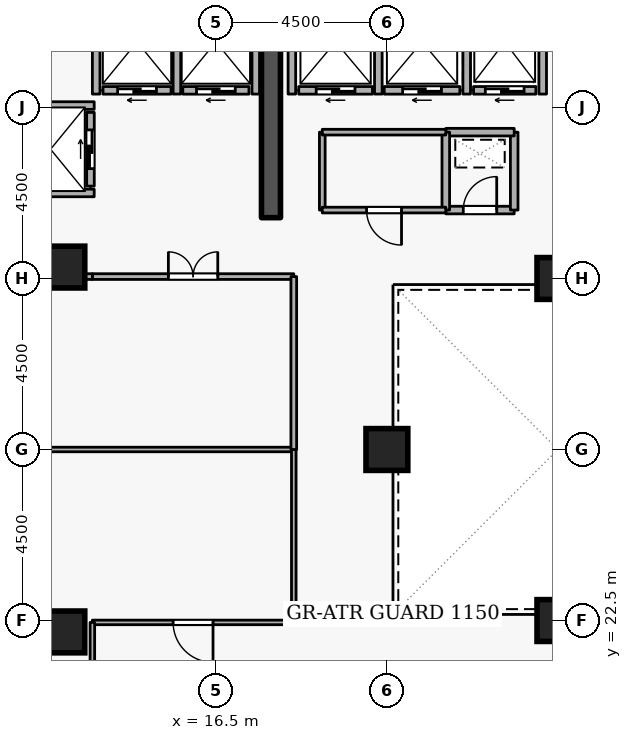
"""IFC4 building model, lengths in metres.
Left out: names, types, materials, properties, quantities, classifications, styles, units other than length and angle.
Written with IfcOpenShell. Run it as: python <this file> out.ifc"""

import sys

from ifc_helpers import new_model, si_unit, direction, frame, frame_2d, origin, origin_2d, place, context, subcontext, project, spatial, rectangle, extrude, element, fill, save


model = new_model("IFC4")
c1 = context("Model", 3, precision=1e-05, world=origin(), true_north=direction((0.0, 1.0)))
c2 = subcontext(c1, "Body", "Model", "MODEL_VIEW")
j1 = project(units=[si_unit("LENGTHUNIT", "METRE"), si_unit("PLANEANGLEUNIT", "RADIAN")], contexts=[c1])
p1 = place(None, origin())
s1 = spatial("IfcSite", under=j1, at=p1, CompositionType="ELEMENT")
p2 = place(p1, origin())
s2 = spatial("IfcBuilding", under=s1, at=p2, CompositionType="ELEMENT")
p3 = place(p2, frame((0.0, 0.0, 182.1)))
s3 = spatial("IfcBuildingStorey", under=s2, at=p3, CompositionType="ELEMENT", Elevation=182.1)
p4 = place(p3, frame((17.95, 33.1, 0.0), z_axis=(0.0, 0.0, 1.0), x_axis=(0.0, 1.0, 0.0)))
e1 = element("IfcWall", 1, at=p4, inside=s3, PredefinedType="SHEAR", context=c2, shape_type="SweptSolid", body=[
    extrude(rectangle(XDim=5.8, YDim=0.5, at=frame_2d((2.9, 0.0))), origin(), (0.0, 0.0, 1.0), 3.6),
])
for number, where, z_axis, x_axis in (
    (2, (12.5, 22.2, 0.0), (0.0, 0.0, 1.0), (1.0, 0.0, 0.0)),
    (3, (12.5, 31.8, 0.0), (0.0, 0.0, 1.0), (1.0, 0.0, 0.0)),
    (4, (25.5, 22.5, 0.0), (0.0, 0.0, 1.0), (1.0, 0.0, 0.0)),
    (5, (25.5, 31.5, 0.0), (0.0, 0.0, 1.0), (1.0, 0.0, 0.0)),
    (6, (21.0, 27.0, 0.0), (0.0, 0.0, 1.0), (1.0, 0.0, 0.0)),
):
    element("IfcColumn", number, at=place(p3, frame(where, z_axis=z_axis, x_axis=x_axis)), inside=s3, PredefinedType="COLUMN", context=c2, shape_type="SweptSolid", body=[
        extrude(rectangle(XDim=1.1, YDim=1.1, at=origin_2d()), origin(), (0.0, 0.0, 1.0), 3.6),
    ])
p5 = place(p3, frame((24.92, 36.45, 0.0), z_axis=(0.0, 0.0, 1.0), x_axis=(-1.0, 0.0, 0.0)))
e7 = element("IfcWall", 7, at=p5, inside=s3, PredefinedType="STANDARD", context=c2, shape_type="SweptSolid", body=[
    extrude(rectangle(XDim=1.64, YDim=0.2, at=frame_2d((0.82, 0.0))), origin(), (0.0, 0.0, 1.0), 3.34),
])
p6 = place(p5, frame((0.31, 0.0, 0.0)))
e8 = element("IfcOpeningElement", 8, at=p6, cuts=e7, PredefinedType="OPENING", context=c2, shape_type="SweptSolid", body=[
    extrude(rectangle(XDim=1.02, YDim=2.06, at=frame_2d((0.51, 1.03))), frame((0.0, 0.11, 0.0), z_axis=(0.0, -1.0, 0.0), x_axis=(1.0, 0.0, 0.0)), (0.0, 0.0, 1.0), 0.22),
])
p7 = place(p3, frame((22.92, 36.45, 0.0), z_axis=(0.0, 0.0, 1.0), x_axis=(-1.0, 0.0, 0.0)))
e9 = element("IfcWall", 9, at=p7, inside=s3, PredefinedType="STANDARD", context=c2, shape_type="SweptSolid", body=[
    extrude(rectangle(XDim=1.99, YDim=0.2, at=frame_2d((0.995, 0.0))), origin(), (0.0, 0.0, 1.0), 3.34),
])
p8 = place(p7, frame((0.485, 0.0, 0.0)))
e10 = element("IfcOpeningElement", 10, at=p8, cuts=e9, PredefinedType="OPENING", context=c2, shape_type="SweptSolid", body=[
    extrude(rectangle(XDim=1.02, YDim=2.06, at=frame_2d((0.51, 1.03))), frame((0.0, 0.11, 0.0), z_axis=(0.0, -1.0, 0.0), x_axis=(1.0, 0.0, 0.0)), (0.0, 0.0, 1.0), 0.22),
])
p9 = place(p3, frame((20.62, 36.45, 0.0), z_axis=(0.0, 0.0, 1.0), x_axis=(-1.0, 0.0, 0.0)))
e11 = element("IfcWall", 11, at=p9, inside=s3, PredefinedType="STANDARD", context=c2, shape_type="SweptSolid", body=[
    extrude(rectangle(XDim=1.94, YDim=0.2, at=frame_2d((0.97, 0.0))), origin(), (0.0, 0.0, 1.0), 3.34),
])
p10 = place(p9, frame((0.46, 0.0, 0.0)))
e12 = element("IfcOpeningElement", 12, at=p10, cuts=e11, PredefinedType="OPENING", context=c2, shape_type="SweptSolid", body=[
    extrude(rectangle(XDim=1.02, YDim=2.06, at=frame_2d((0.51, 1.03))), frame((0.0, 0.11, 0.0), z_axis=(0.0, -1.0, 0.0), x_axis=(1.0, 0.0, 0.0)), (0.0, 0.0, 1.0), 0.22),
])
p11 = place(p3, frame((17.37, 36.45, 0.0), z_axis=(0.0, 0.0, 1.0), x_axis=(-1.0, 0.0, 0.0)))
e13 = element("IfcWall", 13, at=p11, inside=s3, PredefinedType="STANDARD", context=c2, shape_type="SweptSolid", body=[
    extrude(rectangle(XDim=1.74, YDim=0.2, at=frame_2d((0.87, 0.0))), origin(), (0.0, 0.0, 1.0), 3.34),
])
p12 = place(p11, frame((0.36, 0.0, 0.0)))
e14 = element("IfcOpeningElement", 14, at=p12, cuts=e13, PredefinedType="OPENING", context=c2, shape_type="SweptSolid", body=[
    extrude(rectangle(XDim=1.02, YDim=2.06, at=frame_2d((0.51, 1.03))), frame((0.0, 0.11, 0.0), z_axis=(0.0, -1.0, 0.0), x_axis=(1.0, 0.0, 0.0)), (0.0, 0.0, 1.0), 0.22),
])
p13 = place(p3, frame((15.32, 36.45, 0.0), z_axis=(0.0, 0.0, 1.0), x_axis=(-1.0, 0.0, 0.0)))
e15 = element("IfcWall", 15, at=p13, inside=s3, PredefinedType="STANDARD", context=c2, shape_type="SweptSolid", body=[
    extrude(rectangle(XDim=1.79, YDim=0.2, at=frame_2d((0.895, 0.0))), origin(), (0.0, 0.0, 1.0), 3.34),
])
p14 = place(p13, frame((0.385, 0.0, 0.0)))
e16 = element("IfcOpeningElement", 16, at=p14, cuts=e15, PredefinedType="OPENING", context=c2, shape_type="SweptSolid", body=[
    extrude(rectangle(XDim=1.02, YDim=2.06, at=frame_2d((0.51, 1.03))), frame((0.0, 0.11, 0.0), z_axis=(0.0, -1.0, 0.0), x_axis=(1.0, 0.0, 0.0)), (0.0, 0.0, 1.0), 0.22),
])
p15 = place(p3, frame((13.2, 33.93, 0.0), z_axis=(0.0, 0.0, 1.0), x_axis=(0.0, 1.0, 0.0)))
e17 = element("IfcWall", 17, at=p15, inside=s3, PredefinedType="STANDARD", context=c2, shape_type="SweptSolid", body=[
    extrude(rectangle(XDim=1.94, YDim=0.2, at=frame_2d((0.97, 0.0))), origin(), (0.0, 0.0, 1.0), 3.34),
])
p16 = place(p15, frame((0.46, 0.0, 0.0)))
e18 = element("IfcOpeningElement", 18, at=p16, cuts=e17, PredefinedType="OPENING", context=c2, shape_type="SweptSolid", body=[
    extrude(rectangle(XDim=1.02, YDim=2.06, at=frame_2d((0.51, 1.03))), frame((0.0, 0.11, 0.0), z_axis=(0.0, -1.0, 0.0), x_axis=(1.0, 0.0, 0.0)), (0.0, 0.0, 1.0), 0.22),
])
for number, where, z_axis, x_axis in (
    (19, (25.1, 36.352, 0.0), (0.0, 0.0, 1.0), (0.0, 1.0, 0.0)),
    (20, (23.1, 36.352, 0.0), (0.0, 0.0, 1.0), (0.0, 1.0, 0.0)),
    (21, (20.775, 36.352, 0.0), (0.0, 0.0, 1.0), (0.0, 1.0, 0.0)),
    (22, (18.5, 36.352, 0.0), (0.0, 0.0, 1.0), (0.0, 1.0, 0.0)),
):
    element("IfcWall", number, at=place(p3, frame(where, z_axis=z_axis, x_axis=x_axis)), inside=s3, PredefinedType="STANDARD", context=c2, shape_type="SweptSolid", body=[
        extrude(rectangle(XDim=2.536, YDim=0.2, at=frame_2d((1.268, 0.0))), origin(), (0.0, 0.0, 1.0), 3.34),
    ])
p17 = place(p3, frame((17.55, 36.352, 0.0), z_axis=(0.0, 0.0, 1.0), x_axis=(0.0, 1.0, 0.0)))
e23 = element("IfcWall", 23, at=p17, inside=s3, PredefinedType="STANDARD", context=c2, shape_type="SweptSolid", body=[
    extrude(rectangle(XDim=2.636, YDim=0.2, at=frame_2d((1.318, 0.0))), origin(), (0.0, 0.0, 1.0), 2.545),
])
for number, where, z_axis, x_axis in (
    (24, (15.475, 36.352, 0.0), (0.0, 0.0, 1.0), (0.0, 1.0, 0.0)),
    (25, (13.35, 36.352, 0.0), (0.0, 0.0, 1.0), (0.0, 1.0, 0.0)),
):
    element("IfcWall", number, at=place(p3, frame(where, z_axis=z_axis, x_axis=x_axis)), inside=s3, PredefinedType="STANDARD", context=c2, shape_type="SweptSolid", body=[
        extrude(rectangle(XDim=2.636, YDim=0.2, at=frame_2d((1.318, 0.0))), origin(), (0.0, 0.0, 1.0), 3.34),
    ])
for number, where, z_axis, x_axis in (
    (26, (11.002, 36.05, 0.0), (0.0, 0.0, 1.0), (1.0, 0.0, 0.0)),
    (27, (11.002, 33.75, 0.0), (0.0, 0.0, 1.0), (1.0, 0.0, 0.0)),
):
    element("IfcWall", number, at=place(p3, frame(where, z_axis=z_axis, x_axis=x_axis)), inside=s3, PredefinedType="STANDARD", context=c2, shape_type="SweptSolid", body=[
        extrude(rectangle(XDim=2.296, YDim=0.2, at=frame_2d((1.148, 0.0))), origin(), (0.0, 0.0, 1.0), 3.34),
    ])
p18 = place(p3, frame((22.55, 33.3, 0.0), z_axis=(0.0, 0.0, 1.0), x_axis=(1.0, 0.0, 0.0)))
e28 = element("IfcWall", 28, at=p18, inside=s3, PredefinedType="STANDARD", context=c2, shape_type="SweptSolid", body=[
    extrude(rectangle(XDim=1.8, YDim=0.2, at=frame_2d((0.9, 0.0))), origin(), (0.0, 0.0, 1.0), 3.34),
])
p19 = place(p18, frame((0.46, 0.0, 0.0)))
e29 = element("IfcOpeningElement", 29, at=p19, cuts=e28, PredefinedType="OPENING", context=c2, shape_type="SweptSolid", body=[
    extrude(rectangle(XDim=0.88, YDim=2.04, at=frame_2d((0.44, 1.02))), frame((0.0, 0.11, 0.0), z_axis=(0.0, -1.0, 0.0), x_axis=(1.0, 0.0, 0.0)), (0.0, 0.0, 1.0), 0.22),
])
p20 = place(p3, frame((24.35, 33.3, 0.0), z_axis=(0.0, 0.0, 1.0), x_axis=(0.0, 1.0, 0.0)))
e30 = element("IfcWall", 30, at=p20, inside=s3, PredefinedType="STANDARD", context=c2, shape_type="SweptSolid", body=[
    extrude(rectangle(XDim=2.05, YDim=0.2, at=frame_2d((1.025, 0.0))), origin(), (0.0, 0.0, 1.0), 3.34),
])
p21 = place(p3, frame((24.35, 35.35, 0.0), z_axis=(0.0, 0.0, 1.0), x_axis=(-1.0, 0.0, 0.0)))
e31 = element("IfcWall", 31, at=p21, inside=s3, PredefinedType="STANDARD", context=c2, shape_type="SweptSolid", body=[
    extrude(rectangle(XDim=1.8, YDim=0.2, at=frame_2d((0.9, 0.0))), origin(), (0.0, 0.0, 1.0), 3.34),
])
p22 = place(p3, frame((22.55, 35.35, 0.0), z_axis=(0.0, 0.0, 1.0), x_axis=(0.0, -1.0, 0.0)))
e32 = element("IfcWall", 32, at=p22, inside=s3, PredefinedType="STANDARD", context=c2, shape_type="SweptSolid", body=[
    extrude(rectangle(XDim=2.05, YDim=0.2, at=frame_2d((1.025, 0.0))), origin(), (0.0, 0.0, 1.0), 3.34),
])
p23 = place(p3, frame((19.3, 33.3, 0.0), z_axis=(0.0, 0.0, 1.0), x_axis=(0.0, 1.0, 0.0)))
e33 = element("IfcWall", 33, at=p23, inside=s3, PredefinedType="PARTITIONING", context=c2, shape_type="SweptSolid", body=[
    extrude(rectangle(XDim=2.05, YDim=0.15, at=frame_2d((1.025, 0.0))), origin(), (0.0, 0.0, 1.0), 3.34),
])
p24 = place(p3, frame((19.3, 35.35, 0.0), z_axis=(0.0, 0.0, 1.0), x_axis=(1.0, 0.0, 0.0)))
e34 = element("IfcWall", 34, at=p24, inside=s3, PredefinedType="PARTITIONING", context=c2, shape_type="SweptSolid", body=[
    extrude(rectangle(XDim=3.25, YDim=0.15, at=frame_2d((1.625, 0.0))), origin(), (0.0, 0.0, 1.0), 3.34),
])
p25 = place(p3, frame((22.55, 33.3, 0.0), z_axis=(0.0, 0.0, 1.0), x_axis=(-1.0, 0.0, 0.0)))
e35 = element("IfcWall", 35, at=p25, inside=s3, PredefinedType="PARTITIONING", context=c2, shape_type="SweptSolid", body=[
    extrude(rectangle(XDim=3.25, YDim=0.15, at=frame_2d((1.625, 0.0))), origin(), (0.0, 0.0, 1.0), 3.34),
])
p26 = place(p25, frame((1.165, 0.0, 0.0)))
e36 = element("IfcOpeningElement", 36, at=p26, cuts=e35, PredefinedType="OPENING", context=c2, shape_type="SweptSolid", body=[
    extrude(rectangle(XDim=0.92, YDim=2.08, at=frame_2d((0.46, 1.04))), frame((0.0, 0.085, 0.0), z_axis=(0.0, -1.0, 0.0), x_axis=(1.0, 0.0, 0.0)), (0.0, 0.0, 1.0), 0.17),
])
p27 = place(p3, frame((7.78, 27.0, 0.0), z_axis=(0.0, 0.0, 1.0), x_axis=(1.0, 0.0, 0.0)))
e37 = element("IfcWall", 37, at=p27, inside=s3, PredefinedType="PARTITIONING", context=c2, shape_type="SweptSolid", body=[
    extrude(rectangle(XDim=10.77, YDim=0.12, at=frame_2d((5.385, 0.0))), origin(), (0.0, 0.0, 1.0), 2.932),
])
p28 = place(p3, frame((18.55, 27.0, 0.0), z_axis=(0.0, 0.0, 1.0), x_axis=(0.0, -1.0, 0.0)))
e38 = element("IfcWall", 38, at=p28, inside=s3, PredefinedType="PARTITIONING", context=c2, shape_type="SweptSolid", body=[
    extrude(rectangle(XDim=4.55, YDim=0.12, at=frame_2d((2.275, 0.0))), origin(), (0.0, 0.0, 1.0), 3.34),
])
p29 = place(p3, frame((18.55, 22.45, 0.0), z_axis=(0.0, 0.0, 1.0), x_axis=(-1.0, 0.0, 0.0)))
e39 = element("IfcWall", 39, at=p29, inside=s3, PredefinedType="PARTITIONING", context=c2, shape_type="SweptSolid", body=[
    extrude(rectangle(XDim=5.3, YDim=0.12, at=frame_2d((2.65, 0.0))), origin(), (0.0, 0.0, 1.0), 3.34),
])
p30 = place(p29, frame((2.125, 0.0, 0.0)))
e40 = element("IfcOpeningElement", 40, at=p30, cuts=e39, PredefinedType="OPENING", context=c2, shape_type="SweptSolid", body=[
    extrude(rectangle(XDim=1.05, YDim=2.1, at=frame_2d((0.525, 1.05))), frame((0.0, 0.07, 0.0), z_axis=(0.0, -1.0, 0.0), x_axis=(1.0, 0.0, 0.0)), (0.0, 0.0, 1.0), 0.14),
])
p31 = place(p3, frame((13.25, 22.45, 0.0), z_axis=(0.0, 0.0, 1.0), x_axis=(0.0, -1.0, 0.0)))
e41 = element("IfcWall", 41, at=p31, inside=s3, PredefinedType="PARTITIONING", context=c2, shape_type="SweptSolid", body=[
    extrude(rectangle(XDim=1.75, YDim=0.12, at=frame_2d((0.875, 0.0))), origin(), (0.0, 0.0, 1.0), 3.34),
])
p32 = place(p3, frame((13.25, 31.55, 0.0), z_axis=(0.0, 0.0, 1.0), x_axis=(1.0, 0.0, 0.0)))
e42 = element("IfcWall", 42, at=p32, inside=s3, PredefinedType="PARTITIONING", context=c2, shape_type="SweptSolid", body=[
    extrude(rectangle(XDim=5.3, YDim=0.15, at=frame_2d((2.65, 0.0))), origin(), (0.0, 0.0, 1.0), 3.34),
])
p33 = place(p32, frame((2.0, 0.0, 0.0)))
e43 = element("IfcOpeningElement", 43, at=p33, cuts=e42, PredefinedType="OPENING", context=c2, shape_type="SweptSolid", body=[
    extrude(rectangle(XDim=1.3, YDim=2.12, at=frame_2d((0.65, 1.06))), frame((0.0, 0.085, 0.0), z_axis=(0.0, -1.0, 0.0), x_axis=(1.0, 0.0, 0.0)), (0.0, 0.0, 1.0), 0.17),
])
p34 = place(p3, frame((18.55, 31.55, 0.0), z_axis=(0.0, 0.0, 1.0), x_axis=(0.0, -1.0, 0.0)))
e44 = element("IfcWall", 44, at=p34, inside=s3, PredefinedType="PARTITIONING", context=c2, shape_type="SweptSolid", body=[
    extrude(rectangle(XDim=4.55, YDim=0.15, at=frame_2d((2.275, 0.0))), origin(), (0.0, 0.0, 1.0), 3.34),
])
p35 = place(p3, frame((10.9, 31.55, 0.0), z_axis=(0.0, 0.0, 1.0), x_axis=(1.0, 0.0, 0.0)))
e45 = element("IfcWall", 45, at=p35, inside=s3, PredefinedType="PARTITIONING", context=c2, shape_type="SweptSolid", body=[
    extrude(rectangle(XDim=2.35, YDim=0.15, at=frame_2d((1.175, 0.0))), origin(), (0.0, 0.0, 1.0), 3.34),
])
p36 = place(p6, origin())
e46 = element("IfcDoor", 46, at=p36, inside=s3, OperationType="SLIDING_TO_LEFT", PredefinedType="DOOR", context=c2, shape_type="SweptSolid", body=[
    extrude(rectangle(XDim=1.02, YDim=2.06, at=frame_2d((0.51, 1.03))), frame((0.0, 0.025, 0.0), z_axis=(0.0, -1.0, 0.0), x_axis=(1.0, 0.0, 0.0)), (0.0, 0.0, 1.0), 0.05),
])
fill(e8, e46)
p37 = place(p8, origin())
e47 = element("IfcDoor", 47, at=p37, inside=s3, OperationType="SLIDING_TO_LEFT", PredefinedType="DOOR", context=c2, shape_type="SweptSolid", body=[
    extrude(rectangle(XDim=1.02, YDim=2.06, at=frame_2d((0.51, 1.03))), frame((0.0, 0.025, 0.0), z_axis=(0.0, -1.0, 0.0), x_axis=(1.0, 0.0, 0.0)), (0.0, 0.0, 1.0), 0.05),
])
fill(e10, e47)
p38 = place(p10, origin())
e48 = element("IfcDoor", 48, at=p38, inside=s3, OperationType="SLIDING_TO_LEFT", PredefinedType="DOOR", context=c2, shape_type="SweptSolid", body=[
    extrude(rectangle(XDim=1.02, YDim=2.06, at=frame_2d((0.51, 1.03))), frame((0.0, 0.025, 0.0), z_axis=(0.0, -1.0, 0.0), x_axis=(1.0, 0.0, 0.0)), (0.0, 0.0, 1.0), 0.05),
])
fill(e12, e48)
p39 = place(p12, origin())
e49 = element("IfcDoor", 49, at=p39, inside=s3, OperationType="SLIDING_TO_LEFT", PredefinedType="DOOR", context=c2, shape_type="SweptSolid", body=[
    extrude(rectangle(XDim=1.02, YDim=2.06, at=frame_2d((0.51, 1.03))), frame((0.0, 0.025, 0.0), z_axis=(0.0, -1.0, 0.0), x_axis=(1.0, 0.0, 0.0)), (0.0, 0.0, 1.0), 0.05),
])
fill(e14, e49)
p40 = place(p14, origin())
e50 = element("IfcDoor", 50, at=p40, inside=s3, OperationType="SLIDING_TO_LEFT", PredefinedType="DOOR", context=c2, shape_type="SweptSolid", body=[
    extrude(rectangle(XDim=1.02, YDim=2.06, at=frame_2d((0.51, 1.03))), frame((0.0, 0.025, 0.0), z_axis=(0.0, -1.0, 0.0), x_axis=(1.0, 0.0, 0.0)), (0.0, 0.0, 1.0), 0.05),
])
fill(e16, e50)
p41 = place(p16, origin())
e51 = element("IfcDoor", 51, at=p41, inside=s3, OperationType="SLIDING_TO_LEFT", PredefinedType="DOOR", context=c2, shape_type="SweptSolid", body=[
    extrude(rectangle(XDim=1.02, YDim=2.06, at=frame_2d((0.51, 1.03))), frame((0.0, 0.025, 0.0), z_axis=(0.0, -1.0, 0.0), x_axis=(1.0, 0.0, 0.0)), (0.0, 0.0, 1.0), 0.05),
])
fill(e18, e51)
p42 = place(p19, origin())
e52 = element("IfcDoor", 52, at=p42, inside=s3, OperationType="SINGLE_SWING_RIGHT", PredefinedType="DOOR", context=c2, shape_type="SweptSolid", body=[
    extrude(rectangle(XDim=0.88, YDim=2.04, at=frame_2d((0.44, 1.02))), frame((0.0, 0.025, 0.0), z_axis=(0.0, -1.0, 0.0), x_axis=(1.0, 0.0, 0.0)), (0.0, 0.0, 1.0), 0.05),
])
fill(e29, e52)
p43 = place(p26, origin())
e53 = element("IfcDoor", 53, at=p43, inside=s3, OperationType="SINGLE_SWING_LEFT", PredefinedType="DOOR", context=c2, shape_type="SweptSolid", body=[
    extrude(rectangle(XDim=0.92, YDim=2.08, at=frame_2d((0.46, 1.04))), frame((0.0, 0.025, 0.0), z_axis=(0.0, -1.0, 0.0), x_axis=(1.0, 0.0, 0.0)), (0.0, 0.0, 1.0), 0.05),
])
fill(e36, e53)
p44 = place(p30, origin())
e54 = element("IfcDoor", 54, at=p44, inside=s3, OperationType="SINGLE_SWING_LEFT", PredefinedType="DOOR", context=c2, shape_type="SweptSolid", body=[
    extrude(rectangle(XDim=1.05, YDim=2.1, at=frame_2d((0.525, 1.05))), frame((0.0, 0.025, 0.0), z_axis=(0.0, -1.0, 0.0), x_axis=(1.0, 0.0, 0.0)), (0.0, 0.0, 1.0), 0.05),
])
fill(e40, e54)
p45 = place(p33, origin())
e55 = element("IfcDoor", 55, at=p45, inside=s3, OperationType="DOUBLE_DOOR_SINGLE_SWING", PredefinedType="DOOR", context=c2, shape_type="SweptSolid", body=[
    extrude(rectangle(XDim=1.3, YDim=2.12, at=frame_2d((0.65, 1.06))), frame((0.0, 0.025, 0.0), z_axis=(0.0, -1.0, 0.0), x_axis=(1.0, 0.0, 0.0)), (0.0, 0.0, 1.0), 0.05),
])
fill(e43, e55)
save(model, sys.argv[1])
